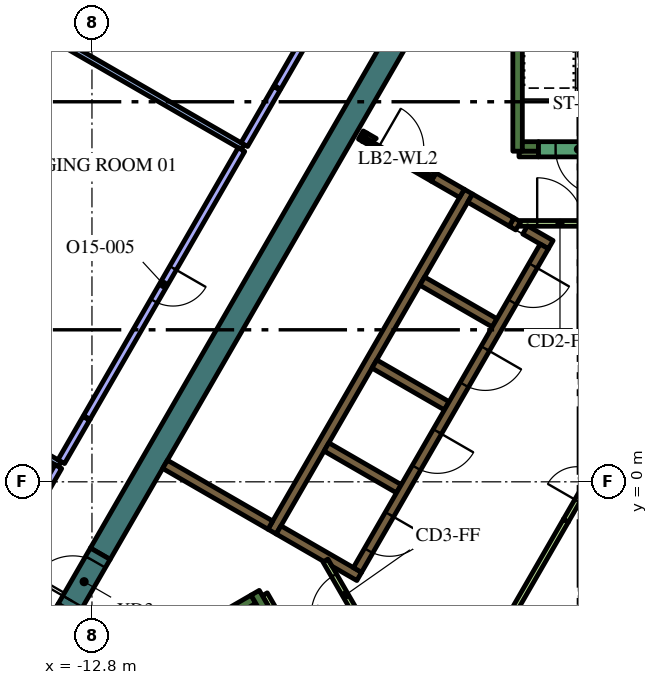
"""IFC4 building model, lengths in metres.
Left out: names, types, materials, properties, quantities, classifications, styles, units other than length and angle.
Written with IfcOpenShell. Run it as: python <this file> out.ifc"""

import sys

from ifc_helpers import new_model, si_unit, direction, frame, frame_2d, origin, place, context, subcontext, project, spatial, polyline, rectangle, outline, extrude, element, fill, save


model = new_model("IFC4")
c1 = context("Model", 3, precision=1e-05, world=origin(), true_north=direction((0.0, 1.0)))
c2 = subcontext(c1, "Body", "Model", "MODEL_VIEW")
j1 = project(units=[si_unit("LENGTHUNIT", "METRE"), si_unit("PLANEANGLEUNIT", "RADIAN")], contexts=[c1])
p1 = place(None, origin())
s1 = spatial("IfcSite", under=j1, at=p1, CompositionType="ELEMENT")
p2 = place(p1, origin())
s2 = spatial("IfcBuilding", under=s1, at=p2, CompositionType="ELEMENT")
p3 = place(p2, frame((0.0, 0.0, 317.4)))
s3 = spatial("IfcBuildingStorey", under=s2, at=p3, CompositionType="ELEMENT", Elevation=317.4)
p4 = place(p3, frame((-13.432, -3.364, 0.0), z_axis=(0.0, 0.0, 1.0), x_axis=(-0.499960127962, -0.866048422692, 0.0)))
e1 = element("IfcWall", 1, at=p4, inside=s3, PredefinedType="SOLIDWALL", context=c2, shape_type="SweptSolid", body=[
    extrude(rectangle(XDim=2.934, YDim=0.6, at=frame_2d((1.467, 0.0))), origin(), (0.0, 0.0, 1.0), 4.2),
])
p5 = place(p3, frame((-12.582, -1.892, 0.0), z_axis=(0.0, 0.0, 1.0), x_axis=(0.500003640647, 0.866023301845, 0.0)))
e2 = element("IfcWall", 2, at=p5, inside=s3, PredefinedType="SOLIDWALL", context=c2, shape_type="SweptSolid", body=[
    extrude(rectangle(XDim=15.858, YDim=0.6, at=frame_2d((7.929, 0.0))), origin(), (0.0, 0.0, 1.0), 4.2),
])
p6 = place(p3, frame((-1.6, 8.7, 0.0), z_axis=(0.0, 0.0, 1.0), x_axis=(0.0, 1.0, 0.0)))
e3 = element("IfcWall", 3, at=p6, inside=s3, PredefinedType="SOLIDWALL", context=c2, shape_type="SweptSolid", body=[
    extrude(rectangle(XDim=7.05, YDim=0.25, at=frame_2d((3.525, 0.0))), origin(), (0.0, 0.0, 1.0), 4.2),
])
p7 = place(p3, frame((-1.475, 8.825, 0.0), z_axis=(0.0, 0.0, 1.0), x_axis=(1.0, 0.0, 0.0)))
e4 = element("IfcWall", 4, at=p7, inside=s3, PredefinedType="SOLIDWALL", context=c2, shape_type="SweptSolid", body=[
    extrude(rectangle(XDim=0.425, YDim=0.25, at=frame_2d((0.212, 0.0))), origin(), (0.0, 0.0, 1.0), 4.2),
])
p8 = place(p3, frame((-14.44, -6.49, 0.0), z_axis=(0.0, 0.0, 1.0), x_axis=(0.866022966069, 0.500004222222, 0.0)))
e5 = element("IfcWall", 5, at=p8, inside=s3, PredefinedType="SOLIDWALL", context=c2, shape_type="SweptSolid", body=[
    extrude(rectangle(XDim=6.8, YDim=0.25, at=frame_2d((3.4, 0.0))), origin(), (0.0, 0.0, 1.0), 4.2),
])
p9 = place(p3, frame((-8.168, -3.503, 0.0), z_axis=(0.0, 0.0, 1.0), x_axis=(-0.499952099219, 0.866053057547, 0.0)))
e6 = element("IfcWall", 6, at=p9, inside=s3, PredefinedType="SOLIDWALL", context=c2, shape_type="SweptSolid", body=[
    extrude(rectangle(XDim=0.675, YDim=0.25, at=frame_2d((0.337, 0.0))), origin(), (0.0, 0.0, 1.0), 4.2),
])
p10 = place(p3, frame((-8.06, -1.311, 0.0), z_axis=(0.0, 0.0, 1.0), x_axis=(0.50000273126, 0.866023826885, 0.0)))
e7 = element("IfcWall", 7, at=p10, inside=s3, PredefinedType="SOLIDWALL", context=c2, shape_type="SweptSolid", body=[
    extrude(rectangle(XDim=10.33, YDim=0.25, at=frame_2d((5.165, 0.0))), origin(), (0.0, 0.0, 1.0), 4.2),
])
p11 = place(p3, frame((-1.758, 6.835, 0.0), z_axis=(0.0, 0.0, 1.0), x_axis=(0.865982457891, -0.500074377092, 0.0)))
e8 = element("IfcWall", 8, at=p11, inside=s3, PredefinedType="SOLIDWALL", context=c2, shape_type="SweptSolid", body=[
    extrude(rectangle(XDim=0.2, YDim=0.25, at=frame_2d((0.1, 0.0))), origin(), (0.0, 0.0, 1.0), 4.2),
])
p12 = place(p3, frame((-1.76, 6.836, 0.0), z_axis=(0.0, 0.0, 1.0), x_axis=(-0.865952863304, 0.500125622755, 0.0)))
e9 = element("IfcWall", 9, at=p12, inside=s3, PredefinedType="SOLIDWALL", context=c2, shape_type="SweptSolid", body=[
    extrude(rectangle(XDim=1.258, YDim=0.25, at=frame_2d((0.629, 0.0))), origin(), (0.0, 0.0, 1.0), 4.2),
])
p13 = place(p3, frame((-0.728, 6.24, 0.0), z_axis=(0.0, 0.0, 1.0), x_axis=(-0.865955664968, 0.500120771724, 0.0)))
e10 = element("IfcWall", 10, at=p13, inside=s3, PredefinedType="SOLIDWALL", context=c2, shape_type="SweptSolid", body=[
    extrude(rectangle(XDim=0.778, YDim=0.25, at=frame_2d((0.389, 0.0))), origin(), (0.0, 0.0, 1.0), 4.2),
])
for number, where, z_axis, x_axis in (
    (11, (-2.204, 4.182, 0.0), (0.0, 0.0, 1.0), (-0.866, 0.5, 0.0)),
    (12, (-5.369, 3.1, 0.0), (0.0, 0.0, 1.0), (0.866, -0.5, 0.0)),
    (13, (-4.724, -0.182, 0.0), (0.0, 0.0, 1.0), (-0.866, 0.5, 0.0)),
):
    element("IfcWall", number, at=place(p3, frame(where, z_axis=z_axis, x_axis=x_axis)), inside=s3, PredefinedType="SOLIDWALL", context=c2, shape_type="SweptSolid", body=[
        extrude(rectangle(XDim=2.2, YDim=0.25, at=frame_2d((1.1, 0.0))), origin(), (0.0, 0.0, 1.0), 4.2),
    ])
p14 = place(p3, origin())
e14 = element("IfcWall", 14, at=p14, inside=s3, PredefinedType="SOLIDWALL", context=c2, shape_type="SweptSolid", body=[
    extrude(outline(polyline([(-5.922, -2.257), (-5.922, -2.257), (-5.705, -2.382), (-5.83, -2.598), (-6.483, -2.221), (-6.591, -2.033), (-6.591, -2.033), (-6.7, -2.096), (-7.952, -1.373), (-7.827, -1.156), (-5.922, -2.257)])), origin(), (0.0, 0.0, 1.0), 4.2),
])
p15 = place(p3, frame((-8.106, -1.14, 0.0), z_axis=(0.0, 0.0, 1.0), x_axis=(-0.866008981251, 0.500028443584, 0.0)))
e15 = element("IfcWall", 15, at=p15, inside=s3, PredefinedType="SOLIDWALL", context=c2, shape_type="SweptSolid", body=[
    extrude(rectangle(XDim=3.2, YDim=0.25, at=frame_2d((1.6, 0.0))), origin(), (0.0, 0.0, 1.0), 4.2),
])
p16 = place(p3, frame((-5.725, 9.125, 0.0), z_axis=(0.0, 0.0, 1.0), x_axis=(0.866185586049, -0.49972245349, 0.0)))
e16 = element("IfcWall", 16, at=p16, inside=s3, PredefinedType="SOLIDWALL", context=c2, shape_type="SweptSolid", body=[
    extrude(rectangle(XDim=0.11, YDim=0.25, at=frame_2d((0.055, 0.0))), origin(), (0.0, 0.0, 1.0), 4.2),
])
p17 = place(p3, frame((-3.066, 7.59, 0.0), z_axis=(0.0, 0.0, 1.0), x_axis=(-0.866081358704, 0.49990307071, 0.0)))
e17 = element("IfcWall", 17, at=p17, inside=s3, PredefinedType="SOLIDWALL", context=c2, shape_type="SweptSolid", body=[
    extrude(rectangle(XDim=0.858, YDim=0.25, at=frame_2d((0.429, 0.0))), origin(), (0.0, 0.0, 1.0), 4.2),
])
e18 = element("IfcWall", 18, at=p14, inside=s3, PredefinedType="SOLIDWALL", context=c2, shape_type="SweptSolid", body=[
    extrude(outline(polyline([(-3.748, 8.128), (-3.813, 8.015), (-4.027, 8.139), (-4.017, 8.156), (-4.008, 8.173), (-4.0, 8.192), (-3.995, 8.21), (-3.991, 8.23), (-3.99, 8.25), (-3.99, 8.268), (-3.748, 8.128)])), origin(), (0.0, 0.0, 1.0), 4.2),
])
e19 = element("IfcWall", 19, at=p14, inside=s3, PredefinedType="SOLIDWALL", context=c2, shape_type="SweptSolid", body=[
    extrude(outline(polyline([(-5.689, 8.96), (-5.69, 8.961), (-5.565, 9.177), (-5.319, 9.035), (-5.335, 9.026), (-5.351, 9.015), (-5.366, 9.002), (-5.379, 8.988), (-5.392, 8.972), (-5.402, 8.956), (-5.412, 8.939), (-5.629, 9.064), (-5.629, 9.064), (-5.689, 8.96)])), origin(), (0.0, 0.0, 1.0), 4.2),
])
for number, where, z_axis, x_axis in (
    (20, (-8.252, -2.958, 0.0), (0.0, 0.0, 1.0), (0.5, -0.866, 0.0)),
    (21, (-1.564, 8.625, 0.0), (0.0, 0.0, 1.0), (1.0, 0.0, 0.0)),
):
    element("IfcWall", number, at=place(p3, frame(where, z_axis=z_axis, x_axis=x_axis)), inside=s3, PredefinedType="PARTITIONING", context=c2, shape_type="SweptSolid", body=[
        extrude(rectangle(XDim=0.514, YDim=0.15, at=frame_2d((0.257, 0.0))), origin(), (0.0, 0.0, 1.0), 3.5),
    ])
p18 = place(p3, frame((-1.887, -3.718, 0.0), z_axis=(0.0, 0.0, 1.0), x_axis=(0.500043732237, 0.866000153493, 0.0)))
e22 = element("IfcWall", 22, at=p18, inside=s3, PredefinedType="PARTITIONING", context=c2, shape_type="SweptSolid", body=[
    extrude(rectangle(XDim=3.114, YDim=0.15, at=frame_2d((1.557, 0.0))), origin(), (0.0, 0.0, 1.0), 3.5),
])
p19 = place(p3, frame((-0.898, 6.194, 0.0), z_axis=(0.0, 0.0, 1.0), x_axis=(-0.499996202215, -0.866027596426, 0.0)))
e23 = element("IfcWall", 23, at=p19, inside=s3, PredefinedType="SOLIDWALL", context=c2, shape_type="SweptSolid", body=[
    extrude(rectangle(XDim=9.83, YDim=0.25, at=frame_2d((4.915, 0.0))), origin(), (0.0, 0.0, 1.0), 4.2),
])
p20 = place(p19, frame((0.585, 0.0, 0.0)))
e24 = element("IfcOpeningElement", 24, at=p20, cuts=e23, PredefinedType="OPENING", context=c2, shape_type="SweptSolid", body=[
    extrude(rectangle(XDim=1.1, YDim=2.1, at=frame_2d((0.55, 1.05))), frame((0.0, 0.135, 0.0), z_axis=(0.0, -1.0, 0.0), x_axis=(1.0, 0.0, 0.0)), (0.0, 0.0, 1.0), 0.27),
])
p21 = place(p19, frame((3.105, 0.0, 0.0)))
e25 = element("IfcOpeningElement", 25, at=p21, cuts=e23, PredefinedType="OPENING", context=c2, shape_type="SweptSolid", body=[
    extrude(rectangle(XDim=1.1, YDim=2.1, at=frame_2d((0.55, 1.05))), frame((0.0, 0.135, 0.0), z_axis=(0.0, -1.0, 0.0), x_axis=(1.0, 0.0, 0.0)), (0.0, 0.0, 1.0), 0.27),
])
p22 = place(p19, frame((5.625, 0.0, 0.0)))
e26 = element("IfcOpeningElement", 26, at=p22, cuts=e23, PredefinedType="OPENING", context=c2, shape_type="SweptSolid", body=[
    extrude(rectangle(XDim=1.1, YDim=2.1, at=frame_2d((0.55, 1.05))), frame((0.0, 0.135, 0.0), z_axis=(0.0, -1.0, 0.0), x_axis=(1.0, 0.0, 0.0)), (0.0, 0.0, 1.0), 0.27),
])
p23 = place(p19, frame((8.145, 0.0, 0.0)))
e27 = element("IfcOpeningElement", 27, at=p23, cuts=e23, PredefinedType="OPENING", context=c2, shape_type="SweptSolid", body=[
    extrude(rectangle(XDim=1.1, YDim=2.1, at=frame_2d((0.55, 1.05))), frame((0.0, 0.135, 0.0), z_axis=(0.0, -1.0, 0.0), x_axis=(1.0, 0.0, 0.0)), (0.0, 0.0, 1.0), 0.27),
])
p24 = place(p3, frame((1.05, 8.75, 0.0), z_axis=(0.0, 0.0, 1.0), x_axis=(-1.0, 0.0, 0.0)))
e28 = element("IfcWall", 28, at=p24, inside=s3, PredefinedType="SOLIDWALL", context=c2, shape_type="SweptSolid", body=[
    extrude(rectangle(XDim=2.1, YDim=0.4, at=frame_2d((1.05, 0.0))), origin(), (0.0, 0.0, 1.0), 4.2),
])
p25 = place(p24, frame((0.45, 0.0, 0.0)))
e29 = element("IfcOpeningElement", 29, at=p25, cuts=e28, PredefinedType="OPENING", context=c2, shape_type="SweptSolid", body=[
    extrude(rectangle(XDim=1.2, YDim=2.1, at=frame_2d((0.6, 1.05))), frame((0.0, 0.21, 0.0), z_axis=(0.0, -1.0, 0.0), x_axis=(1.0, 0.0, 0.0)), (0.0, 0.0, 1.0), 0.42),
])
p26 = place(p3, frame((-0.33, -1.022, 0.0), z_axis=(0.0, 0.0, 1.0), x_axis=(0.500027713859, 0.866009402589, 0.0)))
e30 = element("IfcWall", 30, at=p26, inside=s3, PredefinedType="PARTITIONING", context=c2, shape_type="SweptSolid", body=[
    extrude(rectangle(XDim=2.1, YDim=0.15, at=frame_2d((1.05, 0.0))), origin(), (0.0, 0.0, 1.0), 3.5),
])
p27 = place(p26, frame((0.6, 0.0, 0.0)))
e31 = element("IfcOpeningElement", 31, at=p27, cuts=e30, PredefinedType="OPENING", context=c2, shape_type="SweptSolid", body=[
    extrude(rectangle(XDim=0.9, YDim=2.1, at=frame_2d((0.45, 1.05))), frame((0.0, 0.085, 0.0), z_axis=(0.0, -1.0, 0.0), x_axis=(1.0, 0.0, 0.0)), (0.0, 0.0, 1.0), 0.17),
])
p28 = place(p3, frame((-1.534, 6.8, 0.0), z_axis=(0.0, 0.0, 1.0), x_axis=(1.0, 0.0, 0.0)))
e32 = element("IfcWall", 32, at=p28, inside=s3, PredefinedType="PARTITIONING", context=c2, shape_type="SweptSolid", body=[
    extrude(rectangle(XDim=2.1, YDim=0.15, at=frame_2d((1.05, 0.0))), origin(), (0.0, 0.0, 1.0), 3.5),
])
p29 = place(p28, frame((0.45, 0.0, 0.0)))
e33 = element("IfcOpeningElement", 33, at=p29, cuts=e32, PredefinedType="OPENING", context=c2, shape_type="SweptSolid", body=[
    extrude(rectangle(XDim=1.2, YDim=2.1, at=frame_2d((0.6, 1.05))), frame((0.0, 0.085, 0.0), z_axis=(0.0, -1.0, 0.0), x_axis=(1.0, 0.0, 0.0)), (0.0, 0.0, 1.0), 0.17),
])
p30 = place(p3, frame((-5.606, -3.89, 0.0), z_axis=(0.0, 0.0, 1.0), x_axis=(-0.500027713859, 0.866009402589, 0.0)))
e34 = element("IfcWall", 34, at=p30, inside=s3, PredefinedType="PARTITIONING", context=c2, shape_type="SweptSolid", body=[
    extrude(rectangle(XDim=2.1, YDim=0.15, at=frame_2d((1.05, 0.0))), origin(), (0.0, 0.0, 1.0), 3.5),
])
p31 = place(p30, frame((0.45, 0.0, 0.0)))
e35 = element("IfcOpeningElement", 35, at=p31, cuts=e34, PredefinedType="OPENING", context=c2, shape_type="SweptSolid", body=[
    extrude(rectangle(XDim=1.2, YDim=2.1, at=frame_2d((0.6, 1.05))), frame((0.0, 0.085, 0.0), z_axis=(0.0, -1.0, 0.0), x_axis=(1.0, 0.0, 0.0)), (0.0, 0.0, 1.0), 0.17),
])
p32 = place(p3, frame((-5.659, 9.012, 0.0), z_axis=(0.0, 0.0, 1.0), x_axis=(0.866009402589, -0.500027713859, 0.0)))
e36 = element("IfcWall", 36, at=p32, inside=s3, PredefinedType="PARTITIONING", context=c2, shape_type="SweptSolid", body=[
    extrude(rectangle(XDim=2.1, YDim=0.12, at=frame_2d((1.05, 0.0))), origin(), (0.0, 0.0, 1.0), 3.5),
])
p33 = place(p32, frame((0.45, 0.0, 0.0)))
e37 = element("IfcOpeningElement", 37, at=p33, cuts=e36, PredefinedType="OPENING", context=c2, shape_type="SweptSolid", body=[
    extrude(rectangle(XDim=1.2, YDim=2.1, at=frame_2d((0.6, 1.05))), frame((0.0, 0.07, 0.0), z_axis=(0.0, -1.0, 0.0), x_axis=(1.0, 0.0, 0.0)), (0.0, 0.0, 1.0), 0.14),
])
p34 = place(p3, frame((-13.432, -3.364, 0.0), z_axis=(0.0, 0.0, 1.0), x_axis=(0.500062241894, 0.865989465428, 0.0)))
e38 = element("IfcWall", 38, at=p34, inside=s3, PredefinedType="SOLIDWALL", context=c2, shape_type="SweptSolid", body=[
    extrude(rectangle(XDim=1.7, YDim=0.6, at=frame_2d((0.85, 0.0))), origin(), (0.0, 0.0, 1.0), 4.2),
])
p35 = place(p34, frame((0.25, 0.0, 0.0)))
e39 = element("IfcOpeningElement", 39, at=p35, cuts=e38, PredefinedType="OPENING", context=c2, shape_type="SweptSolid", body=[
    extrude(rectangle(XDim=1.2, YDim=2.1, at=frame_2d((0.6, 1.05))), frame((0.0, 0.31, 0.0), z_axis=(0.0, -1.0, 0.0), x_axis=(1.0, 0.0, 0.0)), (0.0, 0.0, 1.0), 0.62),
])
p36 = place(p3, frame((-8.829, 8.808, 0.0), z_axis=(0.0, 0.0, 1.0), x_axis=(-0.86603673505, 0.499980373158, 0.0)))
e40 = element("IfcWall", 40, at=p36, inside=s3, PredefinedType="PARTITIONING", context=c2, shape_type="SweptSolid", body=[
    extrude(rectangle(XDim=6.255, YDim=0.15, at=frame_2d((3.127, 0.0))), origin(), (0.0, 0.0, 1.0), 3.5),
])
p37 = place(p3, frame((-7.936, 10.355, 0.0), z_axis=(0.0, 0.0, 1.0), x_axis=(-0.500035209441, -0.86600507465, 0.0)))
e41 = element("IfcWall", 41, at=p37, inside=s3, PredefinedType="PARTITIONING", context=c2, shape_type="SweptSolid", body=[
    extrude(rectangle(XDim=1.712, YDim=0.2, at=frame_2d((0.856, 0.0))), origin(), (0.0, 0.0, 1.0), 3.5),
])
p38 = place(p3, frame((-3.523, 17.998, 0.0), z_axis=(0.0, 0.0, 1.0), x_axis=(-0.499996383721, -0.866027491634, 0.0)))
e42 = element("IfcWall", 42, at=p38, inside=s3, PredefinedType="PARTITIONING", context=c2, shape_type="SweptSolid", body=[
    extrude(rectangle(XDim=8.795, YDim=0.2, at=frame_2d((4.397, 0.0))), origin(), (0.0, 0.0, 1.0), 3.5),
])
p39 = place(p38, frame((3.9, 0.0, 0.0)))
e43 = element("IfcOpeningElement", 43, at=p39, cuts=e42, PredefinedType="OPENING", context=c2, shape_type="SweptSolid", body=[
    extrude(rectangle(XDim=1.0, YDim=2.1, at=frame_2d((0.5, 1.05))), frame((0.0, 0.11, 0.0), z_axis=(0.0, -1.0, 0.0), x_axis=(1.0, 0.0, 0.0)), (0.0, 0.0, 1.0), 0.22),
])
p40 = place(p3, frame((-13.646, 0.465, 0.0), z_axis=(0.0, 0.0, 1.0), x_axis=(-0.866033427365, 0.499986102494, 0.0)))
e44 = element("IfcWall", 44, at=p40, inside=s3, PredefinedType="PARTITIONING", context=c2, shape_type="SweptSolid", body=[
    extrude(rectangle(XDim=6.573, YDim=0.15, at=frame_2d((3.287, 0.0))), origin(), (0.0, 0.0, 1.0), 3.5),
])
p41 = place(p3, frame((-8.867, 8.743, 0.0), z_axis=(0.0, 0.0, 1.0), x_axis=(-0.499978679558, -0.866037712797, 0.0)))
e45 = element("IfcWall", 45, at=p41, inside=s3, PredefinedType="PARTITIONING", context=c2, shape_type="SweptSolid", body=[
    extrude(rectangle(XDim=8.138, YDim=0.2, at=frame_2d((4.069, 0.0))), origin(), (0.0, 0.0, 1.0), 3.5),
])
p42 = place(p41, frame((3.6, 0.0, 0.0)))
e46 = element("IfcOpeningElement", 46, at=p42, cuts=e45, PredefinedType="OPENING", context=c2, shape_type="SweptSolid", body=[
    extrude(rectangle(XDim=1.0, YDim=2.1, at=frame_2d((0.5, 1.05))), frame((0.0, 0.11, 0.0), z_axis=(0.0, -1.0, 0.0), x_axis=(1.0, 0.0, 0.0)), (0.0, 0.0, 1.0), 0.22),
])
p43 = place(p3, frame((-12.951, 1.669, 0.0), z_axis=(0.0, 0.0, 1.0), x_axis=(-0.49987242464, -0.866099046925, 0.0)))
e47 = element("IfcWall", 47, at=p43, inside=s3, PredefinedType="PARTITIONING", context=c2, shape_type="SweptSolid", body=[
    extrude(rectangle(XDim=1.315, YDim=0.2, at=frame_2d((0.658, 0.0))), origin(), (0.0, 0.0, 1.0), 3.5),
])
p44 = place(p3, frame((-13.683, 0.4, 0.0), z_axis=(0.0, 0.0, 1.0), x_axis=(-0.500004109969, -0.86602303088, 0.0)))
e48 = element("IfcWall", 48, at=p44, inside=s3, PredefinedType="PARTITIONING", context=c2, shape_type="SweptSolid", body=[
    extrude(rectangle(XDim=7.303, YDim=0.2, at=frame_2d((3.652, 0.0))), origin(), (0.0, 0.0, 1.0), 3.5),
])
p45 = place(p44, frame((2.8, 0.0, 0.0)))
e49 = element("IfcOpeningElement", 49, at=p45, cuts=e48, PredefinedType="OPENING", context=c2, shape_type="SweptSolid", body=[
    extrude(rectangle(XDim=1.8, YDim=2.1, at=frame_2d((0.9, 1.05))), frame((0.0, 0.11, 0.0), z_axis=(0.0, -1.0, 0.0), x_axis=(1.0, 0.0, 0.0)), (0.0, 0.0, 1.0), 0.22),
])
p46 = place(p20, origin())
e50 = element("IfcDoor", 50, at=p46, inside=s3, OperationType="DOUBLE_DOOR_SLIDING", PredefinedType="DOOR", context=c2, shape_type="SweptSolid", body=[
    extrude(rectangle(XDim=1.1, YDim=2.1, at=frame_2d((0.55, 1.05))), frame((0.0, 0.025, 0.0), z_axis=(0.0, -1.0, 0.0), x_axis=(1.0, 0.0, 0.0)), (0.0, 0.0, 1.0), 0.05),
])
fill(e24, e50)
p47 = place(p21, origin())
e51 = element("IfcDoor", 51, at=p47, inside=s3, OperationType="DOUBLE_DOOR_SLIDING", PredefinedType="DOOR", context=c2, shape_type="SweptSolid", body=[
    extrude(rectangle(XDim=1.1, YDim=2.1, at=frame_2d((0.55, 1.05))), frame((0.0, 0.025, 0.0), z_axis=(0.0, -1.0, 0.0), x_axis=(1.0, 0.0, 0.0)), (0.0, 0.0, 1.0), 0.05),
])
fill(e25, e51)
p48 = place(p22, origin())
e52 = element("IfcDoor", 52, at=p48, inside=s3, OperationType="DOUBLE_DOOR_SLIDING", PredefinedType="DOOR", context=c2, shape_type="SweptSolid", body=[
    extrude(rectangle(XDim=1.1, YDim=2.1, at=frame_2d((0.55, 1.05))), frame((0.0, 0.025, 0.0), z_axis=(0.0, -1.0, 0.0), x_axis=(1.0, 0.0, 0.0)), (0.0, 0.0, 1.0), 0.05),
])
fill(e26, e52)
p49 = place(p23, origin())
e53 = element("IfcDoor", 53, at=p49, inside=s3, OperationType="DOUBLE_DOOR_SLIDING", PredefinedType="DOOR", context=c2, shape_type="SweptSolid", body=[
    extrude(rectangle(XDim=1.1, YDim=2.1, at=frame_2d((0.55, 1.05))), frame((0.0, 0.025, 0.0), z_axis=(0.0, -1.0, 0.0), x_axis=(1.0, 0.0, 0.0)), (0.0, 0.0, 1.0), 0.05),
])
fill(e27, e53)
p50 = place(p25, origin())
e54 = element("IfcDoor", 54, at=p50, inside=s3, OperationType="SINGLE_SWING_LEFT", PredefinedType="DOOR", context=c2, shape_type="SweptSolid", body=[
    extrude(rectangle(XDim=1.2, YDim=2.1, at=frame_2d((0.6, 1.05))), frame((0.0, 0.025, 0.0), z_axis=(0.0, -1.0, 0.0), x_axis=(1.0, 0.0, 0.0)), (0.0, 0.0, 1.0), 0.05),
])
fill(e29, e54)
p51 = place(p27, origin())
e55 = element("IfcDoor", 55, at=p51, inside=s3, OperationType="SINGLE_SWING_LEFT", PredefinedType="DOOR", context=c2, shape_type="SweptSolid", body=[
    extrude(rectangle(XDim=0.9, YDim=2.1, at=frame_2d((0.45, 1.05))), frame((0.0, 0.025, 0.0), z_axis=(0.0, -1.0, 0.0), x_axis=(1.0, 0.0, 0.0)), (0.0, 0.0, 1.0), 0.05),
])
fill(e31, e55)
p52 = place(p29, origin())
e56 = element("IfcDoor", 56, at=p52, inside=s3, OperationType="SINGLE_SWING_LEFT", PredefinedType="DOOR", context=c2, shape_type="SweptSolid", body=[
    extrude(rectangle(XDim=1.2, YDim=2.1, at=frame_2d((0.6, 1.05))), frame((0.0, 0.025, 0.0), z_axis=(0.0, -1.0, 0.0), x_axis=(1.0, 0.0, 0.0)), (0.0, 0.0, 1.0), 0.05),
])
fill(e33, e56)
p53 = place(p31, origin())
e57 = element("IfcDoor", 57, at=p53, inside=s3, OperationType="SINGLE_SWING_LEFT", PredefinedType="DOOR", context=c2, shape_type="SweptSolid", body=[
    extrude(rectangle(XDim=1.2, YDim=2.1, at=frame_2d((0.6, 1.05))), frame((0.0, 0.025, 0.0), z_axis=(0.0, -1.0, 0.0), x_axis=(1.0, 0.0, 0.0)), (0.0, 0.0, 1.0), 0.05),
])
fill(e35, e57)
p54 = place(p33, origin())
e58 = element("IfcDoor", 58, at=p54, inside=s3, OperationType="SINGLE_SWING_LEFT", PredefinedType="DOOR", context=c2, shape_type="SweptSolid", body=[
    extrude(rectangle(XDim=1.2, YDim=2.1, at=frame_2d((0.6, 1.05))), frame((0.0, 0.025, 0.0), z_axis=(0.0, -1.0, 0.0), x_axis=(1.0, 0.0, 0.0)), (0.0, 0.0, 1.0), 0.05),
])
fill(e37, e58)
p55 = place(p35, origin())
e59 = element("IfcDoor", 59, at=p55, inside=s3, OperationType="SINGLE_SWING_LEFT", PredefinedType="DOOR", context=c2, shape_type="SweptSolid", body=[
    extrude(rectangle(XDim=1.2, YDim=2.1, at=frame_2d((0.6, 1.05))), frame((0.0, 0.025, 0.0), z_axis=(0.0, -1.0, 0.0), x_axis=(1.0, 0.0, 0.0)), (0.0, 0.0, 1.0), 0.05),
])
fill(e39, e59)
p56 = place(p42, origin())
e60 = element("IfcDoor", 60, at=p56, inside=s3, OperationType="SINGLE_SWING_RIGHT", PredefinedType="DOOR", context=c2, shape_type="SweptSolid", body=[
    extrude(rectangle(XDim=1.0, YDim=2.1, at=frame_2d((0.5, 1.05))), frame((0.0, 0.025, 0.0), z_axis=(0.0, -1.0, 0.0), x_axis=(1.0, 0.0, 0.0)), (0.0, 0.0, 1.0), 0.05),
])
fill(e46, e60)
save(model, sys.argv[1])
